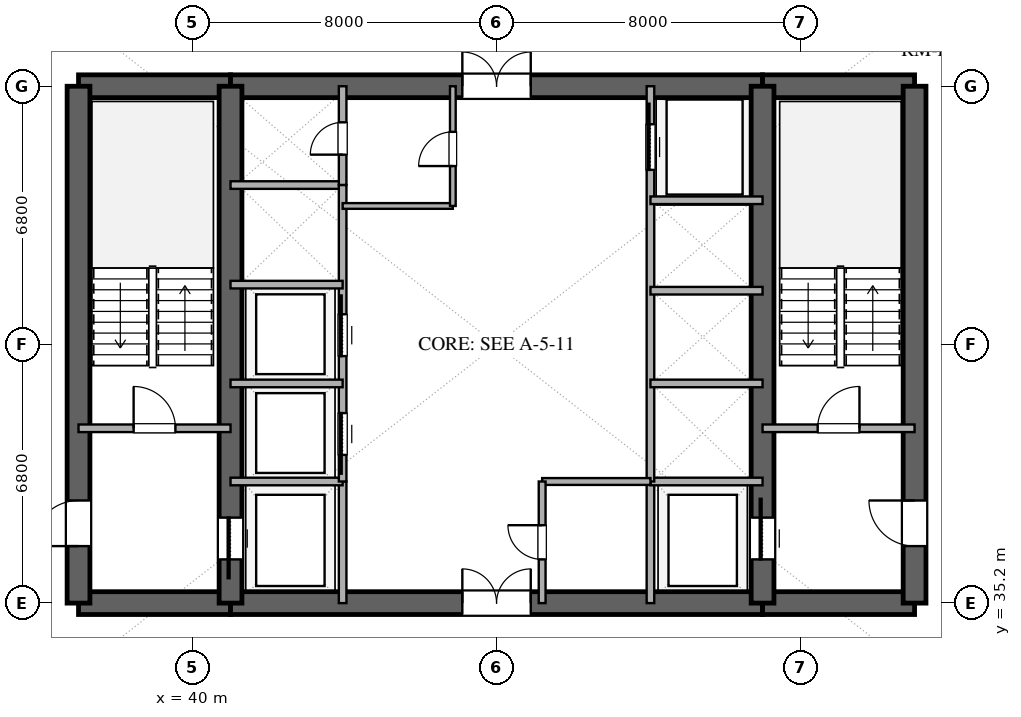
"""IFC4 building model, lengths in metres.
Left out: names, types, materials, properties, quantities, classifications, styles, units other than length and angle.
Written with IfcOpenShell. Run it as: python <this file> out.ifc"""

import sys

from ifc_helpers import new_model, si_unit, direction, frame, frame_2d, origin, place, context, subcontext, project, spatial, rectangle, extrude, element, fill, save


model = new_model("IFC4")
c1 = context("Model", 3, precision=1e-05, world=origin(), true_north=direction((0.0, 1.0)))
c2 = subcontext(c1, "Body", "Model", "MODEL_VIEW")
j1 = project(units=[si_unit("LENGTHUNIT", "METRE"), si_unit("PLANEANGLEUNIT", "RADIAN")], contexts=[c1])
p1 = place(None, origin())
s1 = spatial("IfcSite", under=j1, at=p1, CompositionType="ELEMENT")
p2 = place(p1, origin())
s2 = spatial("IfcBuilding", under=s1, at=p2, CompositionType="ELEMENT")
p3 = place(p2, frame((0.0, 0.0, 49.8)))
s3 = spatial("IfcBuildingStorey", under=s2, at=p3, CompositionType="ELEMENT", Elevation=49.8)
p4 = place(p3, frame((37.0, 35.2, 0.0), z_axis=(0.0, 0.0, 1.0), x_axis=(1.0, 0.0, 0.0)))
e1 = element("IfcWall", 1, at=p4, inside=s3, PredefinedType="SHEAR", context=c2, shape_type="SweptSolid", body=[
    extrude(rectangle(XDim=4.0, YDim=0.6, at=frame_2d((2.0, 0.0))), origin(), (0.0, 0.0, 1.0), 3.38),
])
p5 = place(p3, frame((41.0, 35.2, 0.0), z_axis=(0.0, 0.0, 1.0), x_axis=(1.0, 0.0, 0.0)))
e2 = element("IfcWall", 2, at=p5, inside=s3, PredefinedType="SHEAR", context=c2, shape_type="SweptSolid", body=[
    extrude(rectangle(XDim=14.0, YDim=0.6, at=frame_2d((7.0, 0.0))), origin(), (0.0, 0.0, 1.0), 3.38),
])
p6 = place(p5, frame((6.1, 0.0, 0.0)))
e3 = element("IfcOpeningElement", 3, at=p6, cuts=e2, PredefinedType="OPENING", context=c2, shape_type="SweptSolid", body=[
    extrude(rectangle(XDim=1.8, YDim=2.25, at=frame_2d((0.9, 1.125))), frame((0.0, 0.31, 0.0), z_axis=(0.0, -1.0, 0.0), x_axis=(1.0, 0.0, 0.0)), (0.0, 0.0, 1.0), 0.62),
])
for number, where, z_axis, x_axis in (
    (4, (55.0, 35.2, 0.0), (0.0, 0.0, 1.0), (1.0, 0.0, 0.0)),
    (5, (37.0, 48.8, 0.0), (0.0, 0.0, 1.0), (1.0, 0.0, 0.0)),
):
    element("IfcWall", number, at=place(p3, frame(where, z_axis=z_axis, x_axis=x_axis)), inside=s3, PredefinedType="SHEAR", context=c2, shape_type="SweptSolid", body=[
        extrude(rectangle(XDim=4.0, YDim=0.6, at=frame_2d((2.0, 0.0))), origin(), (0.0, 0.0, 1.0), 3.38),
    ])
p7 = place(p3, frame((41.0, 48.8, 0.0), z_axis=(0.0, 0.0, 1.0), x_axis=(1.0, 0.0, 0.0)))
e6 = element("IfcWall", 6, at=p7, inside=s3, PredefinedType="SHEAR", context=c2, shape_type="SweptSolid", body=[
    extrude(rectangle(XDim=14.0, YDim=0.6, at=frame_2d((7.0, 0.0))), origin(), (0.0, 0.0, 1.0), 3.38),
])
p8 = place(p7, frame((6.1, 0.0, 0.0)))
e7 = element("IfcOpeningElement", 7, at=p8, cuts=e6, PredefinedType="OPENING", context=c2, shape_type="SweptSolid", body=[
    extrude(rectangle(XDim=1.8, YDim=2.25, at=frame_2d((0.9, 1.125))), frame((0.0, 0.31, 0.0), z_axis=(0.0, -1.0, 0.0), x_axis=(1.0, 0.0, 0.0)), (0.0, 0.0, 1.0), 0.62),
])
p9 = place(p3, frame((55.0, 48.8, 0.0), z_axis=(0.0, 0.0, 1.0), x_axis=(1.0, 0.0, 0.0)))
e8 = element("IfcWall", 8, at=p9, inside=s3, PredefinedType="SHEAR", context=c2, shape_type="SweptSolid", body=[
    extrude(rectangle(XDim=4.0, YDim=0.6, at=frame_2d((2.0, 0.0))), origin(), (0.0, 0.0, 1.0), 3.38),
])
p10 = place(p3, frame((37.0, 35.2, 0.0), z_axis=(0.0, 0.0, 1.0), x_axis=(0.0, 1.0, 0.0)))
e9 = element("IfcWall", 9, at=p10, inside=s3, PredefinedType="SHEAR", context=c2, shape_type="SweptSolid", body=[
    extrude(rectangle(XDim=13.6, YDim=0.6, at=frame_2d((6.8, 0.0))), origin(), (0.0, 0.0, 1.0), 3.38),
])
p11 = place(p10, frame((1.5, 0.0, 0.0)))
e10 = element("IfcOpeningElement", 10, at=p11, cuts=e9, PredefinedType="OPENING", context=c2, shape_type="SweptSolid", body=[
    extrude(rectangle(XDim=1.2, YDim=2.15, at=frame_2d((0.6, 1.075))), frame((0.0, 0.31, 0.0), z_axis=(0.0, -1.0, 0.0), x_axis=(1.0, 0.0, 0.0)), (0.0, 0.0, 1.0), 0.62),
])
p12 = place(p3, frame((59.0, 35.2, 0.0), z_axis=(0.0, 0.0, 1.0), x_axis=(0.0, 1.0, 0.0)))
e11 = element("IfcWall", 11, at=p12, inside=s3, PredefinedType="SHEAR", context=c2, shape_type="SweptSolid", body=[
    extrude(rectangle(XDim=13.6, YDim=0.6, at=frame_2d((6.8, 0.0))), origin(), (0.0, 0.0, 1.0), 3.38),
])
p13 = place(p12, frame((1.5, 0.0, 0.0)))
e12 = element("IfcOpeningElement", 12, at=p13, cuts=e11, PredefinedType="OPENING", context=c2, shape_type="SweptSolid", body=[
    extrude(rectangle(XDim=1.2, YDim=2.15, at=frame_2d((0.6, 1.075))), frame((0.0, 0.31, 0.0), z_axis=(0.0, -1.0, 0.0), x_axis=(1.0, 0.0, 0.0)), (0.0, 0.0, 1.0), 0.62),
])
p14 = place(p3, frame((41.0, 35.2, 0.0), z_axis=(0.0, 0.0, 1.0), x_axis=(0.0, 1.0, 0.0)))
e13 = element("IfcWall", 13, at=p14, inside=s3, PredefinedType="SHEAR", context=c2, shape_type="SweptSolid", body=[
    extrude(rectangle(XDim=13.6, YDim=0.6, at=frame_2d((6.8, 0.0))), origin(), (0.0, 0.0, 1.0), 3.38),
])
p15 = place(p14, frame((1.15, 0.0, 0.0)))
e14 = element("IfcOpeningElement", 14, at=p15, cuts=e13, PredefinedType="OPENING", context=c2, shape_type="SweptSolid", body=[
    extrude(rectangle(XDim=1.1, YDim=2.2, at=frame_2d((0.55, 1.1))), frame((0.0, 0.31, 0.0), z_axis=(0.0, -1.0, 0.0), x_axis=(1.0, 0.0, 0.0)), (0.0, 0.0, 1.0), 0.62),
])
p16 = place(p3, frame((55.0, 35.2, 0.0), z_axis=(0.0, 0.0, 1.0), x_axis=(0.0, 1.0, 0.0)))
e15 = element("IfcWall", 15, at=p16, inside=s3, PredefinedType="SHEAR", context=c2, shape_type="SweptSolid", body=[
    extrude(rectangle(XDim=13.6, YDim=0.6, at=frame_2d((6.8, 0.0))), origin(), (0.0, 0.0, 1.0), 3.38),
])
p17 = place(p16, frame((1.15, 0.0, 0.0)))
e16 = element("IfcOpeningElement", 16, at=p17, cuts=e15, PredefinedType="OPENING", context=c2, shape_type="SweptSolid", body=[
    extrude(rectangle(XDim=1.1, YDim=2.2, at=frame_2d((0.55, 1.1))), frame((0.0, 0.31, 0.0), z_axis=(0.0, -1.0, 0.0), x_axis=(1.0, 0.0, 0.0)), (0.0, 0.0, 1.0), 0.62),
])
p18 = place(p3, frame((37.0, 39.8, 0.0), z_axis=(0.0, 0.0, 1.0), x_axis=(1.0, 0.0, 0.0)))
e17 = element("IfcWall", 17, at=p18, inside=s3, PredefinedType="SOLIDWALL", context=c2, shape_type="SweptSolid", body=[
    extrude(rectangle(XDim=4.0, YDim=0.2, at=frame_2d((2.0, 0.0))), origin(), (0.0, 0.0, 1.0), 2.74),
])
p19 = place(p18, frame((1.45, 0.0, 0.0)))
e18 = element("IfcOpeningElement", 18, at=p19, cuts=e17, PredefinedType="OPENING", context=c2, shape_type="SweptSolid", body=[
    extrude(rectangle(XDim=1.1, YDim=2.15, at=frame_2d((0.55, 1.075))), frame((0.0, 0.11, 0.0), z_axis=(0.0, -1.0, 0.0), x_axis=(1.0, 0.0, 0.0)), (0.0, 0.0, 1.0), 0.22),
])
p20 = place(p3, frame((55.0, 39.8, 0.0), z_axis=(0.0, 0.0, 1.0), x_axis=(1.0, 0.0, 0.0)))
e19 = element("IfcWall", 19, at=p20, inside=s3, PredefinedType="SOLIDWALL", context=c2, shape_type="SweptSolid", body=[
    extrude(rectangle(XDim=4.0, YDim=0.2, at=frame_2d((2.0, 0.0))), origin(), (0.0, 0.0, 1.0), 2.74),
])
p21 = place(p20, frame((1.45, 0.0, 0.0)))
e20 = element("IfcOpeningElement", 20, at=p21, cuts=e19, PredefinedType="OPENING", context=c2, shape_type="SweptSolid", body=[
    extrude(rectangle(XDim=1.1, YDim=2.15, at=frame_2d((0.55, 1.075))), frame((0.0, 0.11, 0.0), z_axis=(0.0, -1.0, 0.0), x_axis=(1.0, 0.0, 0.0)), (0.0, 0.0, 1.0), 0.22),
])
p22 = place(p3, frame((43.95, 35.2, 0.0), z_axis=(0.0, 0.0, 1.0), x_axis=(0.0, 1.0, 0.0)))
e21 = element("IfcWall", 21, at=p22, inside=s3, PredefinedType="SOLIDWALL", context=c2, shape_type="SweptSolid", body=[
    extrude(rectangle(XDim=3.2, YDim=0.2, at=frame_2d((1.6, 0.0))), origin(), (0.0, 0.0, 1.0), 2.74),
])
p23 = place(p3, frame((41.0, 38.4, 0.0), z_axis=(0.0, 0.0, 1.0), x_axis=(1.0, 0.0, 0.0)))
e22 = element("IfcWall", 22, at=p23, inside=s3, PredefinedType="SOLIDWALL", context=c2, shape_type="SweptSolid", body=[
    extrude(rectangle(XDim=2.95, YDim=0.2, at=frame_2d((1.475, 0.0))), origin(), (0.0, 0.0, 1.0), 2.74),
])
p24 = place(p3, frame((52.05, 35.2, 0.0), z_axis=(0.0, 0.0, 1.0), x_axis=(0.0, 1.0, 0.0)))
e23 = element("IfcWall", 23, at=p24, inside=s3, PredefinedType="SOLIDWALL", context=c2, shape_type="SweptSolid", body=[
    extrude(rectangle(XDim=3.2, YDim=0.2, at=frame_2d((1.6, 0.0))), origin(), (0.0, 0.0, 1.0), 2.74),
])
for number, where, z_axis, x_axis in (
    (24, (52.05, 38.4, 0.0), (0.0, 0.0, 1.0), (1.0, 0.0, 0.0)),
    (25, (41.0, 46.2, 0.0), (0.0, 0.0, 1.0), (1.0, 0.0, 0.0)),
):
    element("IfcWall", number, at=place(p3, frame(where, z_axis=z_axis, x_axis=x_axis)), inside=s3, PredefinedType="SOLIDWALL", context=c2, shape_type="SweptSolid", body=[
        extrude(rectangle(XDim=2.95, YDim=0.2, at=frame_2d((1.475, 0.0))), origin(), (0.0, 0.0, 1.0), 2.74),
    ])
p25 = place(p3, frame((43.95, 46.2, 0.0), z_axis=(0.0, 0.0, 1.0), x_axis=(0.0, 1.0, 0.0)))
e26 = element("IfcWall", 26, at=p25, inside=s3, PredefinedType="SOLIDWALL", context=c2, shape_type="SweptSolid", body=[
    extrude(rectangle(XDim=2.6, YDim=0.2, at=frame_2d((1.3, 0.0))), origin(), (0.0, 0.0, 1.0), 2.74),
])
p26 = place(p25, frame((0.8, 0.0, 0.0)))
e27 = element("IfcOpeningElement", 27, at=p26, cuts=e26, PredefinedType="OPENING", context=c2, shape_type="SweptSolid", body=[
    extrude(rectangle(XDim=0.85, YDim=2.15, at=frame_2d((0.425, 1.075))), frame((0.0, 0.11, 0.0), z_axis=(0.0, -1.0, 0.0), x_axis=(1.0, 0.0, 0.0)), (0.0, 0.0, 1.0), 0.22),
])
p27 = place(p3, frame((43.95, 38.4, 0.0), z_axis=(0.0, 0.0, 1.0), x_axis=(0.0, 1.0, 0.0)))
e28 = element("IfcWall", 28, at=p27, inside=s3, PredefinedType="SOLIDWALL", context=c2, shape_type="SweptSolid", body=[
    extrude(rectangle(XDim=7.8, YDim=0.2, at=frame_2d((3.9, 0.0))), origin(), (0.0, 0.0, 1.0), 2.74),
])
p28 = place(p27, frame((0.7, 0.0, 0.0)))
e29 = element("IfcOpeningElement", 29, at=p28, cuts=e28, PredefinedType="OPENING", context=c2, shape_type="SweptSolid", body=[
    extrude(rectangle(XDim=1.1, YDim=2.2, at=frame_2d((0.55, 1.1))), frame((0.0, 0.11, 0.0), z_axis=(0.0, -1.0, 0.0), x_axis=(1.0, 0.0, 0.0)), (0.0, 0.0, 1.0), 0.22),
])
p29 = place(p27, frame((3.3, 0.0, 0.0)))
e30 = element("IfcOpeningElement", 30, at=p29, cuts=e28, PredefinedType="OPENING", context=c2, shape_type="SweptSolid", body=[
    extrude(rectangle(XDim=1.1, YDim=2.2, at=frame_2d((0.55, 1.1))), frame((0.0, 0.11, 0.0), z_axis=(0.0, -1.0, 0.0), x_axis=(1.0, 0.0, 0.0)), (0.0, 0.0, 1.0), 0.22),
])
for number, where, z_axis, x_axis in (
    (31, (41.0, 40.98, 0.0), (0.0, 0.0, 1.0), (1.0, 0.0, 0.0)),
    (32, (41.0, 43.58, 0.0), (0.0, 0.0, 1.0), (1.0, 0.0, 0.0)),
):
    element("IfcWall", number, at=place(p3, frame(where, z_axis=z_axis, x_axis=x_axis)), inside=s3, PredefinedType="SOLIDWALL", context=c2, shape_type="SweptSolid", body=[
        extrude(rectangle(XDim=2.95, YDim=0.2, at=frame_2d((1.475, 0.0))), origin(), (0.0, 0.0, 1.0), 2.74),
    ])
p30 = place(p3, frame((52.05, 38.4, 0.0), z_axis=(0.0, 0.0, 1.0), x_axis=(0.0, 1.0, 0.0)))
e33 = element("IfcWall", 33, at=p30, inside=s3, PredefinedType="SOLIDWALL", context=c2, shape_type="SweptSolid", body=[
    extrude(rectangle(XDim=10.4, YDim=0.2, at=frame_2d((5.2, 0.0))), origin(), (0.0, 0.0, 1.0), 2.74),
])
p31 = place(p30, frame((8.2, 0.0, 0.0)))
e34 = element("IfcOpeningElement", 34, at=p31, cuts=e33, PredefinedType="OPENING", context=c2, shape_type="SweptSolid", body=[
    extrude(rectangle(XDim=1.2, YDim=2.2, at=frame_2d((0.6, 1.1))), frame((0.0, 0.11, 0.0), z_axis=(0.0, -1.0, 0.0), x_axis=(1.0, 0.0, 0.0)), (0.0, 0.0, 1.0), 0.22),
])
for number, where, z_axis, x_axis in (
    (35, (52.05, 40.98, 0.0), (0.0, 0.0, 1.0), (1.0, 0.0, 0.0)),
    (36, (52.05, 43.42, 0.0), (0.0, 0.0, 1.0), (1.0, 0.0, 0.0)),
    (37, (52.05, 45.8, 0.0), (0.0, 0.0, 1.0), (1.0, 0.0, 0.0)),
):
    element("IfcWall", number, at=place(p3, frame(where, z_axis=z_axis, x_axis=x_axis)), inside=s3, PredefinedType="SOLIDWALL", context=c2, shape_type="SweptSolid", body=[
        extrude(rectangle(XDim=2.95, YDim=0.2, at=frame_2d((1.475, 0.0))), origin(), (0.0, 0.0, 1.0), 2.74),
    ])
p32 = place(p3, frame((43.95, 45.65, 0.0), z_axis=(0.0, 0.0, 1.0), x_axis=(1.0, 0.0, 0.0)))
e38 = element("IfcWall", 38, at=p32, inside=s3, PredefinedType="PARTITIONING", context=c2, shape_type="SweptSolid", body=[
    extrude(rectangle(XDim=2.9, YDim=0.15, at=frame_2d((1.45, 0.0))), origin(), (0.0, 0.0, 1.0), 2.74),
])
p33 = place(p3, frame((46.85, 45.65, 0.0), z_axis=(0.0, 0.0, 1.0), x_axis=(0.0, 1.0, 0.0)))
e39 = element("IfcWall", 39, at=p33, inside=s3, PredefinedType="PARTITIONING", context=c2, shape_type="SweptSolid", body=[
    extrude(rectangle(XDim=3.15, YDim=0.15, at=frame_2d((1.575, 0.0))), origin(), (0.0, 0.0, 1.0), 2.74),
])
p34 = place(p33, frame((1.05, 0.0, 0.0)))
e40 = element("IfcOpeningElement", 40, at=p34, cuts=e39, PredefinedType="OPENING", context=c2, shape_type="SweptSolid", body=[
    extrude(rectangle(XDim=0.9, YDim=2.15, at=frame_2d((0.45, 1.075))), frame((0.0, 0.085, 0.0), z_axis=(0.0, -1.0, 0.0), x_axis=(1.0, 0.0, 0.0)), (0.0, 0.0, 1.0), 0.17),
])
p35 = place(p3, frame((49.2, 38.4, 0.0), z_axis=(0.0, 0.0, 1.0), x_axis=(1.0, 0.0, 0.0)))
e41 = element("IfcWall", 41, at=p35, inside=s3, PredefinedType="PLUMBINGWALL", context=c2, shape_type="SweptSolid", body=[
    extrude(rectangle(XDim=2.85, YDim=0.18, at=frame_2d((1.425, 0.0))), origin(), (0.0, 0.0, 1.0), 2.74),
])
p36 = place(p3, frame((49.2, 35.2, 0.0), z_axis=(0.0, 0.0, 1.0), x_axis=(0.0, 1.0, 0.0)))
e42 = element("IfcWall", 42, at=p36, inside=s3, PredefinedType="PLUMBINGWALL", context=c2, shape_type="SweptSolid", body=[
    extrude(rectangle(XDim=3.2, YDim=0.18, at=frame_2d((1.6, 0.0))), origin(), (0.0, 0.0, 1.0), 2.74),
])
p37 = place(p36, frame((1.15, 0.0, 0.0)))
e43 = element("IfcOpeningElement", 43, at=p37, cuts=e42, PredefinedType="OPENING", context=c2, shape_type="SweptSolid", body=[
    extrude(rectangle(XDim=0.9, YDim=2.1, at=frame_2d((0.45, 1.05))), frame((0.0, 0.1, 0.0), z_axis=(0.0, -1.0, 0.0), x_axis=(1.0, 0.0, 0.0)), (0.0, 0.0, 1.0), 0.2),
])
p38 = place(p15, origin())
e44 = element("IfcDoor", 44, at=p38, inside=s3, OperationType="SLIDING_TO_LEFT", PredefinedType="DOOR", context=c2, shape_type="SweptSolid", body=[
    extrude(rectangle(XDim=1.1, YDim=2.2, at=frame_2d((0.55, 1.1))), frame((0.0, 0.025, 0.0), z_axis=(0.0, -1.0, 0.0), x_axis=(1.0, 0.0, 0.0)), (0.0, 0.0, 1.0), 0.05),
])
fill(e14, e44)
p39 = place(p17, origin())
e45 = element("IfcDoor", 45, at=p39, inside=s3, OperationType="SLIDING_TO_RIGHT", PredefinedType="DOOR", context=c2, shape_type="SweptSolid", body=[
    extrude(rectangle(XDim=1.1, YDim=2.2, at=frame_2d((0.55, 1.1))), frame((0.0, 0.025, 0.0), z_axis=(0.0, -1.0, 0.0), x_axis=(1.0, 0.0, 0.0)), (0.0, 0.0, 1.0), 0.05),
])
fill(e16, e45)
p40 = place(p11, origin())
e46 = element("IfcDoor", 46, at=p40, inside=s3, OperationType="SINGLE_SWING_LEFT", PredefinedType="DOOR", context=c2, shape_type="SweptSolid", body=[
    extrude(rectangle(XDim=1.2, YDim=2.15, at=frame_2d((0.6, 1.075))), frame((0.0, 0.025, 0.0), z_axis=(0.0, -1.0, 0.0), x_axis=(1.0, 0.0, 0.0)), (0.0, 0.0, 1.0), 0.05),
])
fill(e10, e46)
p41 = place(p13, origin())
e47 = element("IfcDoor", 47, at=p41, inside=s3, OperationType="SINGLE_SWING_RIGHT", PredefinedType="DOOR", context=c2, shape_type="SweptSolid", body=[
    extrude(rectangle(XDim=1.2, YDim=2.15, at=frame_2d((0.6, 1.075))), frame((0.0, 0.025, 0.0), z_axis=(0.0, -1.0, 0.0), x_axis=(1.0, 0.0, 0.0)), (0.0, 0.0, 1.0), 0.05),
])
fill(e12, e47)
p42 = place(p6, origin())
e48 = element("IfcDoor", 48, at=p42, inside=s3, OperationType="DOUBLE_DOOR_SINGLE_SWING", PredefinedType="DOOR", context=c2, shape_type="SweptSolid", body=[
    extrude(rectangle(XDim=1.8, YDim=2.25, at=frame_2d((0.9, 1.125))), frame((0.0, 0.025, 0.0), z_axis=(0.0, -1.0, 0.0), x_axis=(1.0, 0.0, 0.0)), (0.0, 0.0, 1.0), 0.05),
])
fill(e3, e48)
p43 = place(p8, origin())
e49 = element("IfcDoor", 49, at=p43, inside=s3, OperationType="DOUBLE_DOOR_SINGLE_SWING", PredefinedType="DOOR", context=c2, shape_type="SweptSolid", body=[
    extrude(rectangle(XDim=1.8, YDim=2.25, at=frame_2d((0.9, 1.125))), frame((0.0, 0.025, 0.0), z_axis=(0.0, -1.0, 0.0), x_axis=(1.0, 0.0, 0.0)), (0.0, 0.0, 1.0), 0.05),
])
fill(e7, e49)
p44 = place(p19, origin())
e50 = element("IfcDoor", 50, at=p44, inside=s3, OperationType="SINGLE_SWING_LEFT", PredefinedType="DOOR", context=c2, shape_type="SweptSolid", body=[
    extrude(rectangle(XDim=1.1, YDim=2.15, at=frame_2d((0.55, 1.075))), frame((0.0, 0.025, 0.0), z_axis=(0.0, -1.0, 0.0), x_axis=(1.0, 0.0, 0.0)), (0.0, 0.0, 1.0), 0.05),
])
fill(e18, e50)
p45 = place(p21, origin())
e51 = element("IfcDoor", 51, at=p45, inside=s3, OperationType="SINGLE_SWING_RIGHT", PredefinedType="DOOR", context=c2, shape_type="SweptSolid", body=[
    extrude(rectangle(XDim=1.1, YDim=2.15, at=frame_2d((0.55, 1.075))), frame((0.0, 0.025, 0.0), z_axis=(0.0, -1.0, 0.0), x_axis=(1.0, 0.0, 0.0)), (0.0, 0.0, 1.0), 0.05),
])
fill(e20, e51)
p46 = place(p26, origin())
e52 = element("IfcDoor", 52, at=p46, inside=s3, OperationType="SINGLE_SWING_LEFT", PredefinedType="DOOR", context=c2, shape_type="SweptSolid", body=[
    extrude(rectangle(XDim=0.85, YDim=2.15, at=frame_2d((0.425, 1.075))), frame((0.0, 0.025, 0.0), z_axis=(0.0, -1.0, 0.0), x_axis=(1.0, 0.0, 0.0)), (0.0, 0.0, 1.0), 0.05),
])
fill(e27, e52)
p47 = place(p28, origin())
e53 = element("IfcDoor", 53, at=p47, inside=s3, OperationType="SLIDING_TO_LEFT", PredefinedType="DOOR", context=c2, shape_type="SweptSolid", body=[
    extrude(rectangle(XDim=1.1, YDim=2.2, at=frame_2d((0.55, 1.1))), frame((0.0, 0.025, 0.0), z_axis=(0.0, -1.0, 0.0), x_axis=(1.0, 0.0, 0.0)), (0.0, 0.0, 1.0), 0.05),
])
fill(e29, e53)
p48 = place(p29, origin())
e54 = element("IfcDoor", 54, at=p48, inside=s3, OperationType="SLIDING_TO_RIGHT", PredefinedType="DOOR", context=c2, shape_type="SweptSolid", body=[
    extrude(rectangle(XDim=1.1, YDim=2.2, at=frame_2d((0.55, 1.1))), frame((0.0, 0.025, 0.0), z_axis=(0.0, -1.0, 0.0), x_axis=(1.0, 0.0, 0.0)), (0.0, 0.0, 1.0), 0.05),
])
fill(e30, e54)
p49 = place(p31, origin())
e55 = element("IfcDoor", 55, at=p49, inside=s3, OperationType="SLIDING_TO_RIGHT", PredefinedType="DOOR", context=c2, shape_type="SweptSolid", body=[
    extrude(rectangle(XDim=1.2, YDim=2.2, at=frame_2d((0.6, 1.1))), frame((0.0, 0.025, 0.0), z_axis=(0.0, -1.0, 0.0), x_axis=(1.0, 0.0, 0.0)), (0.0, 0.0, 1.0), 0.05),
])
fill(e34, e55)
p50 = place(p34, origin())
e56 = element("IfcDoor", 56, at=p50, inside=s3, OperationType="SINGLE_SWING_LEFT", PredefinedType="DOOR", context=c2, shape_type="SweptSolid", body=[
    extrude(rectangle(XDim=0.9, YDim=2.15, at=frame_2d((0.45, 1.075))), frame((0.0, 0.025, 0.0), z_axis=(0.0, -1.0, 0.0), x_axis=(1.0, 0.0, 0.0)), (0.0, 0.0, 1.0), 0.05),
])
fill(e40, e56)
p51 = place(p37, origin())
e57 = element("IfcDoor", 57, at=p51, inside=s3, OperationType="SINGLE_SWING_RIGHT", PredefinedType="DOOR", context=c2, shape_type="SweptSolid", body=[
    extrude(rectangle(XDim=0.9, YDim=2.1, at=frame_2d((0.45, 1.05))), frame((0.0, 0.025, 0.0), z_axis=(0.0, -1.0, 0.0), x_axis=(1.0, 0.0, 0.0)), (0.0, 0.0, 1.0), 0.05),
])
fill(e43, e57)
save(model, sys.argv[1])
